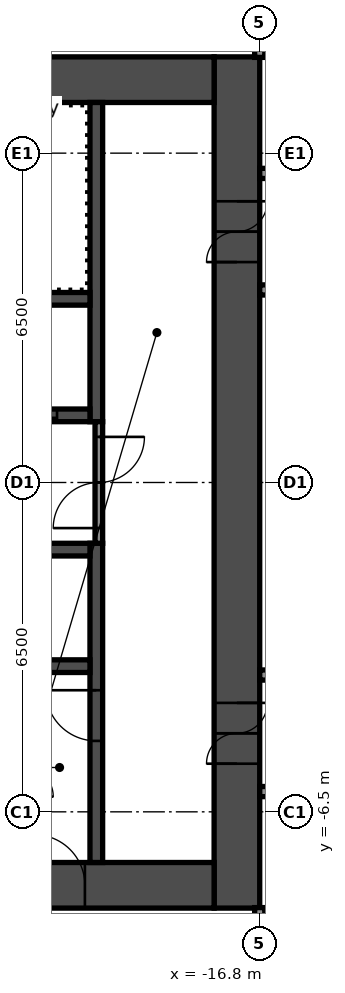
"""IFC4 building model, lengths in metres.
Left out: names, types, materials, properties, quantities, classifications, styles, units other than length and angle.
Written with IfcOpenShell. Run it as: python <this file> out.ifc"""

import sys

from ifc_helpers import new_model, si_unit, direction, frame, frame_2d, origin, place, context, subcontext, project, spatial, rectangle, extrude, element, fill, save


model = new_model("IFC4")
c1 = context("Model", 3, precision=1e-05, world=origin(), true_north=direction((0.0, 1.0)))
c2 = subcontext(c1, "Body", "Model", "MODEL_VIEW")
j1 = project(units=[si_unit("LENGTHUNIT", "METRE"), si_unit("PLANEANGLEUNIT", "RADIAN")], contexts=[c1])
p1 = place(None, origin())
s1 = spatial("IfcSite", under=j1, at=p1, CompositionType="ELEMENT")
p2 = place(p1, origin())
s2 = spatial("IfcBuilding", under=s1, at=p2, CompositionType="ELEMENT")
p3 = place(p2, frame((0.0, 0.0, 55.0)))
s3 = spatial("IfcBuildingStorey", under=s2, at=p3, CompositionType="ELEMENT", Elevation=55.0)
p4 = place(p3, frame((-17.25, -8.4, 0.0), z_axis=(0.0, 0.0, 1.0), x_axis=(0.0, 1.0, 0.0)))
e1 = element("IfcWall", 1, at=p4, inside=s3, PredefinedType="SHEAR", context=c2, shape_type="SweptSolid", body=[
    extrude(rectangle(XDim=16.8, YDim=0.9, at=frame_2d((8.4, 0.0))), origin(), (0.0, 0.0, 1.0), 2.8),
])
p5 = place(p4, frame((12.75, 0.0, 0.0)))
e2 = element("IfcOpeningElement", 2, at=p5, cuts=e1, PredefinedType="OPENING", context=c2, shape_type="SweptSolid", body=[
    extrude(rectangle(XDim=1.2, YDim=2.1, at=frame_2d((0.6, 1.05))), frame((0.0, 0.46, 0.0), z_axis=(0.0, -1.0, 0.0), x_axis=(1.0, 0.0, 0.0)), (0.0, 0.0, 1.0), 0.92),
])
p6 = place(p4, frame((2.85, 0.0, 0.0)))
e3 = element("IfcOpeningElement", 3, at=p6, cuts=e1, PredefinedType="OPENING", context=c2, shape_type="SweptSolid", body=[
    extrude(rectangle(XDim=1.2, YDim=2.1, at=frame_2d((0.6, 1.05))), frame((0.0, 0.46, 0.0), z_axis=(0.0, -1.0, 0.0), x_axis=(1.0, 0.0, 0.0)), (0.0, 0.0, 1.0), 0.92),
])
p7 = place(p3, frame((-32.7, 7.95, 0.0), z_axis=(0.0, 0.0, 1.0), x_axis=(1.0, 0.0, 0.0)))
e4 = element("IfcWall", 4, at=p7, inside=s3, PredefinedType="SHEAR", context=c2, shape_type="SweptSolid", body=[
    extrude(rectangle(XDim=15.0, YDim=0.9, at=frame_2d((7.5, 0.0))), origin(), (0.0, 0.0, 1.0), 2.8),
])
p8 = place(p7, frame((3.4, 0.0, 0.0)))
e5 = element("IfcOpeningElement", 5, at=p8, cuts=e4, PredefinedType="OPENING", context=c2, shape_type="SweptSolid", body=[
    extrude(rectangle(XDim=1.2, YDim=2.1, at=frame_2d((0.6, 1.05))), frame((0.0, 0.46, 0.0), z_axis=(0.0, -1.0, 0.0), x_axis=(1.0, 0.0, 0.0)), (0.0, 0.0, 1.0), 0.92),
])
p9 = place(p7, frame((0.75, 0.0, 0.0)))
e6 = element("IfcOpeningElement", 6, at=p9, cuts=e4, PredefinedType="OPENING", context=c2, shape_type="SweptSolid", body=[
    extrude(rectangle(XDim=0.9, YDim=2.1, at=frame_2d((0.45, 1.05))), frame((0.0, 0.46, 0.0), z_axis=(0.0, -1.0, 0.0), x_axis=(1.0, 0.0, 0.0)), (0.0, 0.0, 1.0), 0.92),
])
p10 = place(p3, frame((-32.7, -7.95, 0.0), z_axis=(0.0, 0.0, 1.0), x_axis=(1.0, 0.0, 0.0)))
e7 = element("IfcWall", 7, at=p10, inside=s3, PredefinedType="SHEAR", context=c2, shape_type="SweptSolid", body=[
    extrude(rectangle(XDim=15.0, YDim=0.9, at=frame_2d((7.5, 0.0))), origin(), (0.0, 0.0, 1.0), 2.8),
])
p11 = place(p10, frame((11.45, 0.0, 0.0)))
e8 = element("IfcOpeningElement", 8, at=p11, cuts=e7, PredefinedType="OPENING", context=c2, shape_type="SweptSolid", body=[
    extrude(rectangle(XDim=1.0, YDim=2.1, at=frame_2d((0.5, 1.05))), frame((0.0, 0.46, 0.0), z_axis=(0.0, -1.0, 0.0), x_axis=(1.0, 0.0, 0.0)), (0.0, 0.0, 1.0), 0.92),
])
p12 = place(p3, frame((-20.025, 1.2, 0.0), z_axis=(0.0, 0.0, 1.0), x_axis=(0.0, 1.0, 0.0)))
e9 = element("IfcWall", 9, at=p12, inside=s3, PredefinedType="SHEAR", context=c2, shape_type="SweptSolid", body=[
    extrude(rectangle(XDim=6.3, YDim=0.25, at=frame_2d((3.15, 0.0))), origin(), (0.0, 0.0, 1.0), 2.8),
])
p13 = place(p3, frame((-20.025, -7.5, 0.0), z_axis=(0.0, 0.0, 1.0), x_axis=(0.0, 1.0, 0.0)))
e10 = element("IfcWall", 10, at=p13, inside=s3, PredefinedType="SHEAR", context=c2, shape_type="SweptSolid", body=[
    extrude(rectangle(XDim=6.3, YDim=0.25, at=frame_2d((3.15, 0.0))), origin(), (0.0, 0.0, 1.0), 2.8),
])
p14 = place(p13, frame((2.4, 0.0, 0.0)))
e11 = element("IfcOpeningElement", 11, at=p14, cuts=e10, PredefinedType="OPENING", context=c2, shape_type="SweptSolid", body=[
    extrude(rectangle(XDim=1.0, YDim=2.1, at=frame_2d((0.5, 1.05))), frame((0.0, 0.135, 0.0), z_axis=(0.0, -1.0, 0.0), x_axis=(1.0, 0.0, 0.0)), (0.0, 0.0, 1.0), 0.27),
])
p15 = place(p3, frame((-27.65, 1.325, 0.0), z_axis=(0.0, 0.0, 1.0), x_axis=(1.0, 0.0, 0.0)))
e12 = element("IfcWall", 12, at=p15, inside=s3, PredefinedType="SHEAR", context=c2, shape_type="SweptSolid", body=[
    extrude(rectangle(XDim=7.5, YDim=0.25, at=frame_2d((3.75, 0.0))), origin(), (0.0, 0.0, 1.0), 2.8),
])
p16 = place(p15, frame((5.75, 0.0, 0.0)))
e13 = element("IfcOpeningElement", 13, at=p16, cuts=e12, PredefinedType="OPENING", context=c2, shape_type="SweptSolid", body=[
    extrude(rectangle(XDim=1.1, YDim=2.1, at=frame_2d((0.55, 1.05))), frame((0.0, 0.135, 0.0), z_axis=(0.0, -1.0, 0.0), x_axis=(1.0, 0.0, 0.0)), (0.0, 0.0, 1.0), 0.27),
])
p17 = place(p15, frame((3.35, 0.0, 0.0)))
e14 = element("IfcOpeningElement", 14, at=p17, cuts=e12, PredefinedType="OPENING", context=c2, shape_type="SweptSolid", body=[
    extrude(rectangle(XDim=1.1, YDim=2.1, at=frame_2d((0.55, 1.05))), frame((0.0, 0.135, 0.0), z_axis=(0.0, -1.0, 0.0), x_axis=(1.0, 0.0, 0.0)), (0.0, 0.0, 1.0), 0.27),
])
p18 = place(p15, frame((0.95, 0.0, 0.0)))
e15 = element("IfcOpeningElement", 15, at=p18, cuts=e12, PredefinedType="OPENING", context=c2, shape_type="SweptSolid", body=[
    extrude(rectangle(XDim=1.1, YDim=2.1, at=frame_2d((0.55, 1.05))), frame((0.0, 0.135, 0.0), z_axis=(0.0, -1.0, 0.0), x_axis=(1.0, 0.0, 0.0)), (0.0, 0.0, 1.0), 0.27),
])
for number, where, z_axis, x_axis in (
    (16, (-27.65, 3.625, 0.0), (0.0, 0.0, 1.0), (1.0, 0.0, 0.0)),
    (17, (-27.65, -1.325, 0.0), (0.0, 0.0, 1.0), (1.0, 0.0, 0.0)),
    (18, (-27.65, -3.625, 0.0), (0.0, 0.0, 1.0), (1.0, 0.0, 0.0)),
):
    element("IfcWall", number, at=place(p3, frame(where, z_axis=z_axis, x_axis=x_axis)), inside=s3, PredefinedType="SHEAR", context=c2, shape_type="SweptSolid", body=[
        extrude(rectangle(XDim=7.5, YDim=0.25, at=frame_2d((3.75, 0.0))), origin(), (0.0, 0.0, 1.0), 2.8),
    ])
p19 = place(p3, frame((-19.975, -1.2, 0.0), z_axis=(0.0, 0.0, 1.0), x_axis=(0.0, 1.0, 0.0)))
e19 = element("IfcWall", 19, at=p19, inside=s3, PredefinedType="PARTITIONING", context=c2, shape_type="SweptSolid", body=[
    extrude(rectangle(XDim=2.4, YDim=0.15, at=frame_2d((1.2, 0.0))), origin(), (0.0, 0.0, 1.0), 2.8),
])
p20 = place(p19, frame((0.3, 0.0, 0.0)))
e20 = element("IfcOpeningElement", 20, at=p20, cuts=e19, PredefinedType="OPENING", context=c2, shape_type="SweptSolid", body=[
    extrude(rectangle(XDim=1.8, YDim=2.1, at=frame_2d((0.9, 1.05))), frame((0.0, 0.085, 0.0), z_axis=(0.0, -1.0, 0.0), x_axis=(1.0, 0.0, 0.0)), (0.0, 0.0, 1.0), 0.17),
])
p21 = place(p3, frame((-16.8, -6.1, 0.0), z_axis=(0.0, 0.0, 1.0), x_axis=(1.0, 0.0, 0.0)))
e21 = element("IfcWall", 21, at=p21, inside=s3, PredefinedType="PARTITIONING", context=c2, shape_type="SweptSolid", body=[
    extrude(rectangle(XDim=33.6, YDim=0.2, at=frame_2d((16.8, 0.0))), origin(), (0.0, 0.0, 1.0), 2.8),
])
p22 = place(p21, frame((2.85, 0.0, 0.0)))
e22 = element("IfcOpeningElement", 22, at=p22, cuts=e21, PredefinedType="OPENING", context=c2, shape_type="SweptSolid", body=[
    extrude(rectangle(XDim=1.0, YDim=2.1, at=frame_2d((0.5, 1.05))), frame((0.0, 0.11, 0.0), z_axis=(0.0, -1.0, 0.0), x_axis=(1.0, 0.0, 0.0)), (0.0, 0.0, 1.0), 0.22),
])
p23 = place(p21, frame((4.55, 0.0, 0.0)))
e23 = element("IfcOpeningElement", 23, at=p23, cuts=e21, PredefinedType="OPENING", context=c2, shape_type="SweptSolid", body=[
    extrude(rectangle(XDim=1.0, YDim=2.1, at=frame_2d((0.5, 1.05))), frame((0.0, 0.11, 0.0), z_axis=(0.0, -1.0, 0.0), x_axis=(1.0, 0.0, 0.0)), (0.0, 0.0, 1.0), 0.22),
])
p24 = place(p21, frame((11.25, 0.0, 0.0)))
e24 = element("IfcOpeningElement", 24, at=p24, cuts=e21, PredefinedType="OPENING", context=c2, shape_type="SweptSolid", body=[
    extrude(rectangle(XDim=1.0, YDim=2.1, at=frame_2d((0.5, 1.05))), frame((0.0, 0.11, 0.0), z_axis=(0.0, -1.0, 0.0), x_axis=(1.0, 0.0, 0.0)), (0.0, 0.0, 1.0), 0.22),
])
p25 = place(p21, frame((12.95, 0.0, 0.0)))
e25 = element("IfcOpeningElement", 25, at=p25, cuts=e21, PredefinedType="OPENING", context=c2, shape_type="SweptSolid", body=[
    extrude(rectangle(XDim=1.0, YDim=2.1, at=frame_2d((0.5, 1.05))), frame((0.0, 0.11, 0.0), z_axis=(0.0, -1.0, 0.0), x_axis=(1.0, 0.0, 0.0)), (0.0, 0.0, 1.0), 0.22),
])
p26 = place(p21, frame((18.7, 0.0, 0.0)))
e26 = element("IfcOpeningElement", 26, at=p26, cuts=e21, PredefinedType="OPENING", context=c2, shape_type="SweptSolid", body=[
    extrude(rectangle(XDim=0.9, YDim=2.1, at=frame_2d((0.45, 1.05))), frame((0.0, 0.11, 0.0), z_axis=(0.0, -1.0, 0.0), x_axis=(1.0, 0.0, 0.0)), (0.0, 0.0, 1.0), 0.22),
])
p27 = place(p21, frame((22.9, 0.0, 0.0)))
e27 = element("IfcOpeningElement", 27, at=p27, cuts=e21, PredefinedType="OPENING", context=c2, shape_type="SweptSolid", body=[
    extrude(rectangle(XDim=0.9, YDim=2.1, at=frame_2d((0.45, 1.05))), frame((0.0, 0.11, 0.0), z_axis=(0.0, -1.0, 0.0), x_axis=(1.0, 0.0, 0.0)), (0.0, 0.0, 1.0), 0.22),
])
p28 = place(p21, frame((28.05, 0.0, 0.0)))
e28 = element("IfcOpeningElement", 28, at=p28, cuts=e21, PredefinedType="OPENING", context=c2, shape_type="SweptSolid", body=[
    extrude(rectangle(XDim=1.0, YDim=2.1, at=frame_2d((0.5, 1.05))), frame((0.0, 0.11, 0.0), z_axis=(0.0, -1.0, 0.0), x_axis=(1.0, 0.0, 0.0)), (0.0, 0.0, 1.0), 0.22),
])
p29 = place(p21, frame((29.75, 0.0, 0.0)))
e29 = element("IfcOpeningElement", 29, at=p29, cuts=e21, PredefinedType="OPENING", context=c2, shape_type="SweptSolid", body=[
    extrude(rectangle(XDim=1.0, YDim=2.1, at=frame_2d((0.5, 1.05))), frame((0.0, 0.11, 0.0), z_axis=(0.0, -1.0, 0.0), x_axis=(1.0, 0.0, 0.0)), (0.0, 0.0, 1.0), 0.22),
])
p30 = place(p3, frame((-16.8, -3.8, 0.0), z_axis=(0.0, 0.0, 1.0), x_axis=(1.0, 0.0, 0.0)))
e30 = element("IfcWall", 30, at=p30, inside=s3, PredefinedType="PARTITIONING", context=c2, shape_type="SweptSolid", body=[
    extrude(rectangle(XDim=33.6, YDim=0.2, at=frame_2d((16.8, 0.0))), origin(), (0.0, 0.0, 1.0), 2.8),
])
p31 = place(p30, frame((9.8, 0.0, 0.0)))
e31 = element("IfcOpeningElement", 31, at=p31, cuts=e30, PredefinedType="OPENING", context=c2, shape_type="SweptSolid", body=[
    extrude(rectangle(XDim=0.9, YDim=2.1, at=frame_2d((0.45, 1.05))), frame((0.0, 0.11, 0.0), z_axis=(0.0, -1.0, 0.0), x_axis=(1.0, 0.0, 0.0)), (0.0, 0.0, 1.0), 0.22),
])
p32 = place(p30, frame((14.0, 0.0, 0.0)))
e32 = element("IfcOpeningElement", 32, at=p32, cuts=e30, PredefinedType="OPENING", context=c2, shape_type="SweptSolid", body=[
    extrude(rectangle(XDim=0.9, YDim=2.1, at=frame_2d((0.45, 1.05))), frame((0.0, 0.11, 0.0), z_axis=(0.0, -1.0, 0.0), x_axis=(1.0, 0.0, 0.0)), (0.0, 0.0, 1.0), 0.22),
])
p33 = place(p30, frame((26.43, 0.0, 0.0)))
e33 = element("IfcOpeningElement", 33, at=p33, cuts=e30, PredefinedType="OPENING", context=c2, shape_type="SweptSolid", body=[
    extrude(rectangle(XDim=0.9, YDim=2.1, at=frame_2d((0.45, 1.05))), frame((0.0, 0.11, 0.0), z_axis=(0.0, -1.0, 0.0), x_axis=(1.0, 0.0, 0.0)), (0.0, 0.0, 1.0), 0.22),
])
p34 = place(p30, frame((30.63, 0.0, 0.0)))
e34 = element("IfcOpeningElement", 34, at=p34, cuts=e30, PredefinedType="OPENING", context=c2, shape_type="SweptSolid", body=[
    extrude(rectangle(XDim=0.9, YDim=2.1, at=frame_2d((0.45, 1.05))), frame((0.0, 0.11, 0.0), z_axis=(0.0, -1.0, 0.0), x_axis=(1.0, 0.0, 0.0)), (0.0, 0.0, 1.0), 0.22),
])
p35 = place(p3, frame((-16.8, 3.8, 0.0), z_axis=(0.0, 0.0, 1.0), x_axis=(1.0, 0.0, 0.0)))
e35 = element("IfcWall", 35, at=p35, inside=s3, PredefinedType="PARTITIONING", context=c2, shape_type="SweptSolid", body=[
    extrude(rectangle(XDim=33.6, YDim=0.2, at=frame_2d((16.8, 0.0))), origin(), (0.0, 0.0, 1.0), 2.8),
])
p36 = place(p35, frame((1.48, 0.0, 0.0)))
e36 = element("IfcOpeningElement", 36, at=p36, cuts=e35, PredefinedType="OPENING", context=c2, shape_type="SweptSolid", body=[
    extrude(rectangle(XDim=0.9, YDim=2.1, at=frame_2d((0.45, 1.05))), frame((0.0, 0.11, 0.0), z_axis=(0.0, -1.0, 0.0), x_axis=(1.0, 0.0, 0.0)), (0.0, 0.0, 1.0), 0.22),
])
p37 = place(p35, frame((5.68, 0.0, 0.0)))
e37 = element("IfcOpeningElement", 37, at=p37, cuts=e35, PredefinedType="OPENING", context=c2, shape_type="SweptSolid", body=[
    extrude(rectangle(XDim=0.9, YDim=2.1, at=frame_2d((0.45, 1.05))), frame((0.0, 0.11, 0.0), z_axis=(0.0, -1.0, 0.0), x_axis=(1.0, 0.0, 0.0)), (0.0, 0.0, 1.0), 0.22),
])
p38 = place(p35, frame((18.785, 0.0, 0.0)))
e38 = element("IfcOpeningElement", 38, at=p38, cuts=e35, PredefinedType="OPENING", context=c2, shape_type="SweptSolid", body=[
    extrude(rectangle(XDim=0.9, YDim=2.1, at=frame_2d((0.45, 1.05))), frame((0.0, 0.11, 0.0), z_axis=(0.0, -1.0, 0.0), x_axis=(1.0, 0.0, 0.0)), (0.0, 0.0, 1.0), 0.22),
])
p39 = place(p35, frame((22.985, 0.0, 0.0)))
e39 = element("IfcOpeningElement", 39, at=p39, cuts=e35, PredefinedType="OPENING", context=c2, shape_type="SweptSolid", body=[
    extrude(rectangle(XDim=0.9, YDim=2.1, at=frame_2d((0.45, 1.05))), frame((0.0, 0.11, 0.0), z_axis=(0.0, -1.0, 0.0), x_axis=(1.0, 0.0, 0.0)), (0.0, 0.0, 1.0), 0.22),
])
p40 = place(p3, frame((-16.8, 6.1, 0.0), z_axis=(0.0, 0.0, 1.0), x_axis=(1.0, 0.0, 0.0)))
e40 = element("IfcWall", 40, at=p40, inside=s3, PredefinedType="PARTITIONING", context=c2, shape_type="SweptSolid", body=[
    extrude(rectangle(XDim=33.6, YDim=0.2, at=frame_2d((16.8, 0.0))), origin(), (0.0, 0.0, 1.0), 2.8),
])
p41 = place(p40, frame((2.85, 0.0, 0.0)))
e41 = element("IfcOpeningElement", 41, at=p41, cuts=e40, PredefinedType="OPENING", context=c2, shape_type="SweptSolid", body=[
    extrude(rectangle(XDim=1.0, YDim=2.1, at=frame_2d((0.5, 1.05))), frame((0.0, 0.11, 0.0), z_axis=(0.0, -1.0, 0.0), x_axis=(1.0, 0.0, 0.0)), (0.0, 0.0, 1.0), 0.22),
])
p42 = place(p40, frame((4.55, 0.0, 0.0)))
e42 = element("IfcOpeningElement", 42, at=p42, cuts=e40, PredefinedType="OPENING", context=c2, shape_type="SweptSolid", body=[
    extrude(rectangle(XDim=1.0, YDim=2.1, at=frame_2d((0.5, 1.05))), frame((0.0, 0.11, 0.0), z_axis=(0.0, -1.0, 0.0), x_axis=(1.0, 0.0, 0.0)), (0.0, 0.0, 1.0), 0.22),
])
p43 = place(p40, frame((10.555, 0.0, 0.0)))
e43 = element("IfcOpeningElement", 43, at=p43, cuts=e40, PredefinedType="OPENING", context=c2, shape_type="SweptSolid", body=[
    extrude(rectangle(XDim=0.9, YDim=2.1, at=frame_2d((0.45, 1.05))), frame((0.0, 0.11, 0.0), z_axis=(0.0, -1.0, 0.0), x_axis=(1.0, 0.0, 0.0)), (0.0, 0.0, 1.0), 0.22),
])
p44 = place(p40, frame((14.755, 0.0, 0.0)))
e44 = element("IfcOpeningElement", 44, at=p44, cuts=e40, PredefinedType="OPENING", context=c2, shape_type="SweptSolid", body=[
    extrude(rectangle(XDim=0.9, YDim=2.1, at=frame_2d((0.45, 1.05))), frame((0.0, 0.11, 0.0), z_axis=(0.0, -1.0, 0.0), x_axis=(1.0, 0.0, 0.0)), (0.0, 0.0, 1.0), 0.22),
])
p45 = place(p40, frame((19.65, 0.0, 0.0)))
e45 = element("IfcOpeningElement", 45, at=p45, cuts=e40, PredefinedType="OPENING", context=c2, shape_type="SweptSolid", body=[
    extrude(rectangle(XDim=1.0, YDim=2.1, at=frame_2d((0.5, 1.05))), frame((0.0, 0.11, 0.0), z_axis=(0.0, -1.0, 0.0), x_axis=(1.0, 0.0, 0.0)), (0.0, 0.0, 1.0), 0.22),
])
p46 = place(p40, frame((21.35, 0.0, 0.0)))
e46 = element("IfcOpeningElement", 46, at=p46, cuts=e40, PredefinedType="OPENING", context=c2, shape_type="SweptSolid", body=[
    extrude(rectangle(XDim=1.0, YDim=2.1, at=frame_2d((0.5, 1.05))), frame((0.0, 0.11, 0.0), z_axis=(0.0, -1.0, 0.0), x_axis=(1.0, 0.0, 0.0)), (0.0, 0.0, 1.0), 0.22),
])
p47 = place(p40, frame((28.05, 0.0, 0.0)))
e47 = element("IfcOpeningElement", 47, at=p47, cuts=e40, PredefinedType="OPENING", context=c2, shape_type="SweptSolid", body=[
    extrude(rectangle(XDim=1.0, YDim=2.1, at=frame_2d((0.5, 1.05))), frame((0.0, 0.11, 0.0), z_axis=(0.0, -1.0, 0.0), x_axis=(1.0, 0.0, 0.0)), (0.0, 0.0, 1.0), 0.22),
])
p48 = place(p40, frame((29.75, 0.0, 0.0)))
e48 = element("IfcOpeningElement", 48, at=p48, cuts=e40, PredefinedType="OPENING", context=c2, shape_type="SweptSolid", body=[
    extrude(rectangle(XDim=1.0, YDim=2.1, at=frame_2d((0.5, 1.05))), frame((0.0, 0.11, 0.0), z_axis=(0.0, -1.0, 0.0), x_axis=(1.0, 0.0, 0.0)), (0.0, 0.0, 1.0), 0.22),
])
for number, where, z_axis, x_axis in (
    (49, (-16.8, -20.3, 0.0), (0.0, 0.0, 1.0), (0.0, 1.0, 0.0)),
    (50, (-16.8, 8.39, 0.0), (0.0, 0.0, 1.0), (0.0, 1.0, 0.0)),
):
    element("IfcWall", number, at=place(p3, frame(where, z_axis=z_axis, x_axis=x_axis)), inside=s3, PredefinedType="PARTITIONING", context=c2, shape_type="SweptSolid", body=[
        extrude(rectangle(XDim=11.91, YDim=0.2, at=frame_2d((5.955, 0.0))), origin(), (0.0, 0.0, 1.0), 2.8),
    ])
p49 = place(p5, origin())
e51 = element("IfcDoor", 51, at=p49, inside=s3, OperationType="DOUBLE_DOOR_SINGLE_SWING", PredefinedType="DOOR", context=c2, shape_type="SweptSolid", body=[
    extrude(rectangle(XDim=1.2, YDim=2.1, at=frame_2d((0.6, 1.05))), frame((0.0, 0.025, 0.0), z_axis=(0.0, -1.0, 0.0), x_axis=(1.0, 0.0, 0.0)), (0.0, 0.0, 1.0), 0.05),
])
fill(e2, e51)
p50 = place(p6, origin())
e52 = element("IfcDoor", 52, at=p50, inside=s3, OperationType="DOUBLE_DOOR_SINGLE_SWING", PredefinedType="DOOR", context=c2, shape_type="SweptSolid", body=[
    extrude(rectangle(XDim=1.2, YDim=2.1, at=frame_2d((0.6, 1.05))), frame((0.0, 0.025, 0.0), z_axis=(0.0, -1.0, 0.0), x_axis=(1.0, 0.0, 0.0)), (0.0, 0.0, 1.0), 0.05),
])
fill(e3, e52)
p51 = place(p11, origin())
e53 = element("IfcDoor", 53, at=p51, inside=s3, OperationType="SINGLE_SWING_RIGHT", PredefinedType="DOOR", context=c2, shape_type="SweptSolid", body=[
    extrude(rectangle(XDim=1.0, YDim=2.1, at=frame_2d((0.5, 1.05))), frame((0.0, 0.025, 0.0), z_axis=(0.0, -1.0, 0.0), x_axis=(1.0, 0.0, 0.0)), (0.0, 0.0, 1.0), 0.05),
])
fill(e8, e53)
p52 = place(p14, origin())
e54 = element("IfcDoor", 54, at=p52, inside=s3, OperationType="SINGLE_SWING_LEFT", PredefinedType="DOOR", context=c2, shape_type="SweptSolid", body=[
    extrude(rectangle(XDim=1.0, YDim=2.1, at=frame_2d((0.5, 1.05))), frame((0.0, 0.025, 0.0), z_axis=(0.0, -1.0, 0.0), x_axis=(1.0, 0.0, 0.0)), (0.0, 0.0, 1.0), 0.05),
])
fill(e11, e54)
p53 = place(p20, origin())
e55 = element("IfcDoor", 55, at=p53, inside=s3, OperationType="DOUBLE_DOOR_SINGLE_SWING", PredefinedType="DOOR", context=c2, shape_type="SweptSolid", body=[
    extrude(rectangle(XDim=1.8, YDim=2.1, at=frame_2d((0.9, 1.05))), frame((0.0, 0.025, 0.0), z_axis=(0.0, -1.0, 0.0), x_axis=(1.0, 0.0, 0.0)), (0.0, 0.0, 1.0), 0.05),
])
fill(e20, e55)
p54 = place(p16, origin())
e56 = element("IfcDoor", 56, at=p54, inside=s3, OperationType="DOUBLE_DOOR_SLIDING", PredefinedType="DOOR", context=c2, shape_type="SweptSolid", body=[
    extrude(rectangle(XDim=1.1, YDim=2.1, at=frame_2d((0.55, 1.05))), frame((0.0, 0.025, 0.0), z_axis=(0.0, -1.0, 0.0), x_axis=(1.0, 0.0, 0.0)), (0.0, 0.0, 1.0), 0.05),
])
fill(e13, e56)
save(model, sys.argv[1])
